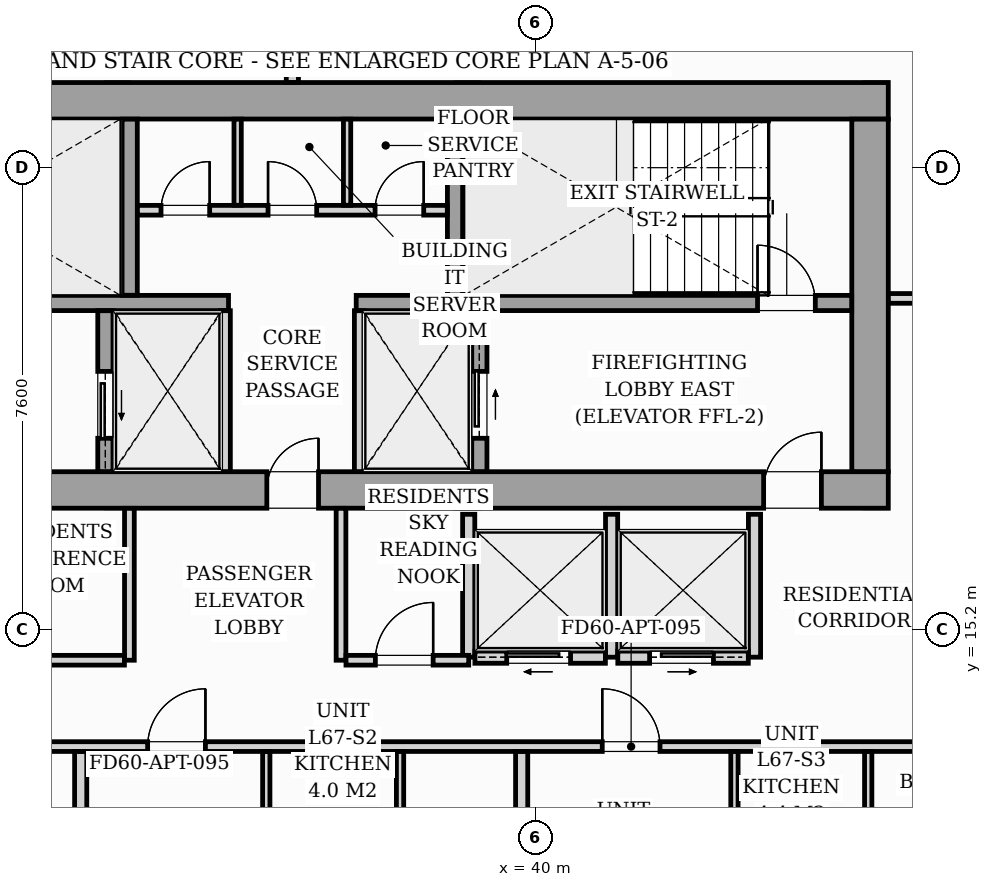
"""IFC4 building model, lengths in metres.
Left out: names, types, materials, properties, quantities, classifications, styles, units other than length and angle.
Written with IfcOpenShell. Run it as: python <this file> out.ifc"""

import sys

from ifc_helpers import new_model, si_unit, direction, frame, frame_2d, origin, origin_2d, place, context, subcontext, project, spatial, rectangle, i_section, extrude, source, transform, mapped, element, fill, save


model = new_model("IFC4")
c1 = context("Model", 3, precision=1e-05, world=origin(), true_north=direction((0.0, 1.0)))
c2 = subcontext(c1, "Body", "Model", "MODEL_VIEW")
j1 = project(units=[si_unit("LENGTHUNIT", "METRE"), si_unit("PLANEANGLEUNIT", "RADIAN")], contexts=[c1])
p1 = place(None, origin())
s1 = spatial("IfcSite", under=j1, at=p1, CompositionType="ELEMENT")
p2 = place(p1, origin())
s2 = spatial("IfcBuilding", under=s1, at=p2, CompositionType="ELEMENT")
p3 = place(p2, frame((0.0, 0.0, 233.1)))
s3 = spatial("IfcBuildingStorey", under=s2, at=p3, CompositionType="ELEMENT", Elevation=233.1)
m1 = source(origin(), c2, "Body", "SweptSolid", [
    extrude(i_section(OverallWidth=0.409, OverallDepth=0.425, WebThickness=0.033, FlangeThickness=0.052, FilletRadius=0.018, at=origin_2d()), origin(), (0.0, 0.0, 1.0), 3.296),
])
for number, where, z_axis, x_axis in (
    (1, (33.12, 17.4, 0.002), (0.0, 0.0, 1.0), (1.0, 0.0, 0.0)),
    (2, (38.88, 17.4, 0.002), (0.0, 0.0, 1.0), (1.0, 0.0, 0.0)),
    (3, (45.6, 17.4, 0.002), (0.0, 0.0, 1.0), (1.0, 0.0, 0.0)),
    (4, (33.12, 24.0, 0.002), (0.0, 0.0, 1.0), (1.0, 0.0, 0.0)),
    (5, (38.88, 24.0, 0.002), (0.0, 0.0, 1.0), (1.0, 0.0, 0.0)),
    (6, (45.6, 24.0, 0.002), (0.0, 0.0, 1.0), (1.0, 0.0, 0.0)),
):
    element("IfcColumn", number, at=place(p3, frame(where, z_axis=z_axis, x_axis=x_axis)), inside=s3, PredefinedType="PILASTER", context=c2, shape_type="MappedRepresentation", body=[
        mapped(m1, transform((0.0, 0.0, 0.0), scale=1.0)),
    ])
p4 = place(p3, frame((26.2, 17.5, 0.0), z_axis=(0.0, 0.0, 1.0), x_axis=(1.0, 0.0, 0.0)))
e7 = element("IfcWall", 7, at=p4, inside=s3, PredefinedType="SHEAR", context=c2, shape_type="SweptSolid", body=[
    extrude(rectangle(XDim=19.6, YDim=0.6, at=frame_2d((9.8, 0.0))), origin(), (0.0, 0.0, 1.0), 3.3),
])
p5 = place(p4, frame((0.95, 0.0, 0.0)))
e8 = element("IfcOpeningElement", 8, at=p5, cuts=e7, PredefinedType="OPENING", context=c2, shape_type="SweptSolid", body=[
    extrude(rectangle(XDim=0.95, YDim=2.06, at=frame_2d((0.475, 1.03))), frame((0.0, 0.31, 0.0), z_axis=(0.0, -1.0, 0.0), x_axis=(1.0, 0.0, 0.0)), (0.0, 0.0, 1.0), 0.62),
])
p6 = place(p4, frame((9.38, 0.0, 0.0)))
e9 = element("IfcOpeningElement", 9, at=p6, cuts=e7, PredefinedType="OPENING", context=c2, shape_type="SweptSolid", body=[
    extrude(rectangle(XDim=0.85, YDim=2.0, at=frame_2d((0.425, 1.0))), frame((0.0, 0.31, 0.0), z_axis=(0.0, -1.0, 0.0), x_axis=(1.0, 0.0, 0.0)), (0.0, 0.0, 1.0), 0.62),
])
p7 = place(p4, frame((17.55, 0.0, 0.0)))
e10 = element("IfcOpeningElement", 10, at=p7, cuts=e7, PredefinedType="OPENING", context=c2, shape_type="SweptSolid", body=[
    extrude(rectangle(XDim=0.95, YDim=2.06, at=frame_2d((0.475, 1.03))), frame((0.0, 0.31, 0.0), z_axis=(0.0, -1.0, 0.0), x_axis=(1.0, 0.0, 0.0)), (0.0, 0.0, 1.0), 0.62),
])
p8 = place(p3, frame((26.2, 23.9, 0.0), z_axis=(0.0, 0.0, 1.0), x_axis=(1.0, 0.0, 0.0)))
e11 = element("IfcWall", 11, at=p8, inside=s3, PredefinedType="SHEAR", context=c2, shape_type="SweptSolid", body=[
    extrude(rectangle(XDim=19.6, YDim=0.6, at=frame_2d((9.8, 0.0))), origin(), (0.0, 0.0, 1.0), 3.3),
])
p9 = place(p3, frame((45.5, 17.802, 0.0), z_axis=(0.0, 0.0, 1.0), x_axis=(0.0, 1.0, 0.0)))
e12 = element("IfcWall", 12, at=p9, inside=s3, PredefinedType="SHEAR", context=c2, shape_type="SweptSolid", body=[
    extrude(rectangle(XDim=5.796, YDim=0.6, at=frame_2d((2.898, 0.0))), origin(), (0.0, 0.0, 1.0), 3.3),
])
p10 = place(p3, frame((26.802, 20.575, 0.0), z_axis=(0.0, 0.0, 1.0), x_axis=(1.0, 0.0, 0.0)))
e13 = element("IfcWall", 13, at=p10, inside=s3, PredefinedType="SOLIDWALL", context=c2, shape_type="SweptSolid", body=[
    extrude(rectangle(XDim=8.148, YDim=0.25, at=frame_2d((4.074, 0.0))), origin(), (0.0, 0.0, 1.0), 3.3),
])
p11 = place(p10, frame((0.298, 0.0, 0.0)))
e14 = element("IfcOpeningElement", 14, at=p11, cuts=e13, PredefinedType="OPENING", context=c2, shape_type="SweptSolid", body=[
    extrude(rectangle(XDim=0.95, YDim=2.06, at=frame_2d((0.475, 1.03))), frame((0.0, 0.135, 0.0), z_axis=(0.0, -1.0, 0.0), x_axis=(1.0, 0.0, 0.0)), (0.0, 0.0, 1.0), 0.27),
])
p12 = place(p3, frame((37.05, 20.575, 0.0), z_axis=(0.0, 0.0, 1.0), x_axis=(1.0, 0.0, 0.0)))
e15 = element("IfcWall", 15, at=p12, inside=s3, PredefinedType="SOLIDWALL", context=c2, shape_type="SweptSolid", body=[
    extrude(rectangle(XDim=8.148, YDim=0.25, at=frame_2d((4.074, 0.0))), origin(), (0.0, 0.0, 1.0), 3.3),
])
p13 = place(p12, frame((6.6, 0.0, 0.0)))
e16 = element("IfcOpeningElement", 16, at=p13, cuts=e15, PredefinedType="OPENING", context=c2, shape_type="SweptSolid", body=[
    extrude(rectangle(XDim=0.95, YDim=2.06, at=frame_2d((0.475, 1.03))), frame((0.0, 0.135, 0.0), z_axis=(0.0, -1.0, 0.0), x_axis=(1.0, 0.0, 0.0)), (0.0, 0.0, 1.0), 0.27),
])
for number, where, z_axis, x_axis in (
    (17, (33.325, 20.702, 0.0), (0.0, 0.0, 1.0), (0.0, 1.0, 0.0)),
    (18, (38.675, 20.702, 0.0), (0.0, 0.0, 1.0), (0.0, 1.0, 0.0)),
):
    element("IfcWall", number, at=place(p3, frame(where, z_axis=z_axis, x_axis=x_axis)), inside=s3, PredefinedType="SOLIDWALL", context=c2, shape_type="SweptSolid", body=[
        extrude(rectangle(XDim=2.896, YDim=0.25, at=frame_2d((1.448, 0.0))), origin(), (0.0, 0.0, 1.0), 3.3),
    ])
p14 = place(p3, frame((32.925, 17.802, 0.0), z_axis=(0.0, 0.0, 1.0), x_axis=(0.0, 1.0, 0.0)))
e19 = element("IfcWall", 19, at=p14, inside=s3, PredefinedType="SOLIDWALL", context=c2, shape_type="SweptSolid", body=[
    extrude(rectangle(XDim=2.646, YDim=0.25, at=frame_2d((1.323, 0.0))), origin(), (0.0, 0.0, 1.0), 3.3),
])
p15 = place(p14, frame((0.548, 0.0, 0.0)))
e20 = element("IfcOpeningElement", 20, at=p15, cuts=e19, PredefinedType="OPENING", context=c2, shape_type="SweptSolid", body=[
    extrude(rectangle(XDim=1.1, YDim=2.08, at=frame_2d((0.55, 1.04))), frame((0.0, 0.135, 0.0), z_axis=(0.0, -1.0, 0.0), x_axis=(1.0, 0.0, 0.0)), (0.0, 0.0, 1.0), 0.27),
])
for number, where, z_axis, x_axis in (
    (21, (34.9, 17.802, 0.0), (0.0, 0.0, 1.0), (0.0, 1.0, 0.0)),
    (22, (37.1, 17.802, 0.0), (0.0, 0.0, 1.0), (0.0, 1.0, 0.0)),
):
    element("IfcWall", number, at=place(p3, frame(where, z_axis=z_axis, x_axis=x_axis)), inside=s3, PredefinedType="PARTITIONING", context=c2, shape_type="SweptSolid", body=[
        extrude(rectangle(XDim=2.646, YDim=0.16, at=frame_2d((1.323, 0.0))), origin(), (0.0, 0.0, 1.0), 3.04),
    ])
p16 = place(p3, frame((39.075, 17.802, 0.0), z_axis=(0.0, 0.0, 1.0), x_axis=(0.0, 1.0, 0.0)))
e23 = element("IfcWall", 23, at=p16, inside=s3, PredefinedType="SOLIDWALL", context=c2, shape_type="SweptSolid", body=[
    extrude(rectangle(XDim=2.646, YDim=0.25, at=frame_2d((1.323, 0.0))), origin(), (0.0, 0.0, 1.0), 3.3),
])
p17 = place(p16, frame((0.548, 0.0, 0.0)))
e24 = element("IfcOpeningElement", 24, at=p17, cuts=e23, PredefinedType="OPENING", context=c2, shape_type="SweptSolid", body=[
    extrude(rectangle(XDim=1.1, YDim=2.08, at=frame_2d((0.55, 1.04))), frame((0.0, 0.135, 0.0), z_axis=(0.0, -1.0, 0.0), x_axis=(1.0, 0.0, 0.0)), (0.0, 0.0, 1.0), 0.27),
])
p18 = place(p3, frame((33.452, 22.1, 0.0), z_axis=(0.0, 0.0, 1.0), x_axis=(1.0, 0.0, 0.0)))
e25 = element("IfcWall", 25, at=p18, inside=s3, PredefinedType="PARTITIONING", context=c2, shape_type="SweptSolid", body=[
    extrude(rectangle(XDim=5.096, YDim=0.16, at=frame_2d((2.548, 0.0))), origin(), (0.0, 0.0, 1.0), 3.04),
])
p19 = place(p18, frame((0.388, 0.0, 0.0)))
e26 = element("IfcOpeningElement", 26, at=p19, cuts=e25, PredefinedType="OPENING", context=c2, shape_type="SweptSolid", body=[
    extrude(rectangle(XDim=0.8, YDim=2.05, at=frame_2d((0.4, 1.025))), frame((0.0, 0.09, 0.0), z_axis=(0.0, -1.0, 0.0), x_axis=(1.0, 0.0, 0.0)), (0.0, 0.0, 1.0), 0.18),
])
p20 = place(p18, frame((2.148, 0.0, 0.0)))
e27 = element("IfcOpeningElement", 27, at=p20, cuts=e25, PredefinedType="OPENING", context=c2, shape_type="SweptSolid", body=[
    extrude(rectangle(XDim=0.8, YDim=2.05, at=frame_2d((0.4, 1.025))), frame((0.0, 0.09, 0.0), z_axis=(0.0, -1.0, 0.0), x_axis=(1.0, 0.0, 0.0)), (0.0, 0.0, 1.0), 0.18),
])
p21 = place(p18, frame((3.908, 0.0, 0.0)))
e28 = element("IfcOpeningElement", 28, at=p21, cuts=e25, PredefinedType="OPENING", context=c2, shape_type="SweptSolid", body=[
    extrude(rectangle(XDim=0.8, YDim=2.05, at=frame_2d((0.4, 1.025))), frame((0.0, 0.09, 0.0), z_axis=(0.0, -1.0, 0.0), x_axis=(1.0, 0.0, 0.0)), (0.0, 0.0, 1.0), 0.18),
])
for number, where, z_axis, x_axis in (
    (29, (35.1, 22.182, 0.0), (0.0, 0.0, 1.0), (0.0, 1.0, 0.0)),
    (30, (36.9, 22.182, 0.0), (0.0, 0.0, 1.0), (0.0, 1.0, 0.0)),
):
    element("IfcWall", number, at=place(p3, frame(where, z_axis=z_axis, x_axis=x_axis)), inside=s3, PredefinedType="PARTITIONING", context=c2, shape_type="SweptSolid", body=[
        extrude(rectangle(XDim=1.416, YDim=0.12, at=frame_2d((0.708, 0.0))), origin(), (0.0, 0.0, 1.0), 3.04),
    ])
for number, where, z_axis, x_axis in (
    (31, (38.9, 14.75, 0.0), (0.0, 0.0, 1.0), (0.0, 1.0, 0.0)),
    (32, (41.25, 14.75, 0.0), (0.0, 0.0, 1.0), (0.0, 1.0, 0.0)),
    (33, (43.6, 14.75, 0.0), (0.0, 0.0, 1.0), (0.0, 1.0, 0.0)),
):
    element("IfcWall", number, at=place(p3, frame(where, z_axis=z_axis, x_axis=x_axis)), inside=s3, PredefinedType="PARTITIONING", context=c2, shape_type="SweptSolid", body=[
        extrude(rectangle(XDim=2.35, YDim=0.2, at=frame_2d((1.175, 0.0))), origin(), (0.0, 0.0, 1.0), 3.04),
    ])
p22 = place(p3, frame((39.002, 14.75, 0.0), z_axis=(0.0, 0.0, 1.0), x_axis=(1.0, 0.0, 0.0)))
e34 = element("IfcWall", 34, at=p22, inside=s3, PredefinedType="PARTITIONING", context=c2, shape_type="SweptSolid", body=[
    extrude(rectangle(XDim=2.146, YDim=0.2, at=frame_2d((1.073, 0.0))), origin(), (0.0, 0.0, 1.0), 3.04),
])
p23 = place(p22, frame((0.523, 0.0, 0.0)))
e35 = element("IfcOpeningElement", 35, at=p23, cuts=e34, PredefinedType="OPENING", context=c2, shape_type="SweptSolid", body=[
    extrude(rectangle(XDim=1.05, YDim=2.08, at=frame_2d((0.525, 1.04))), frame((0.0, 0.11, 0.0), z_axis=(0.0, -1.0, 0.0), x_axis=(1.0, 0.0, 0.0)), (0.0, 0.0, 1.0), 0.22),
])
p24 = place(p3, frame((41.352, 14.75, 0.0), z_axis=(0.0, 0.0, 1.0), x_axis=(1.0, 0.0, 0.0)))
e36 = element("IfcWall", 36, at=p24, inside=s3, PredefinedType="PARTITIONING", context=c2, shape_type="SweptSolid", body=[
    extrude(rectangle(XDim=2.146, YDim=0.2, at=frame_2d((1.073, 0.0))), origin(), (0.0, 0.0, 1.0), 3.04),
])
p25 = place(p24, frame((0.523, 0.0, 0.0)))
e37 = element("IfcOpeningElement", 37, at=p25, cuts=e36, PredefinedType="OPENING", context=c2, shape_type="SweptSolid", body=[
    extrude(rectangle(XDim=1.05, YDim=2.08, at=frame_2d((0.525, 1.04))), frame((0.0, 0.11, 0.0), z_axis=(0.0, -1.0, 0.0), x_axis=(1.0, 0.0, 0.0)), (0.0, 0.0, 1.0), 0.22),
])
p26 = place(p3, frame((26.12, 13.28, 0.0), z_axis=(0.0, 0.0, 1.0), x_axis=(1.0, 0.0, 0.0)))
e38 = element("IfcWall", 38, at=p26, inside=s3, PredefinedType="PARTITIONING", context=c2, shape_type="SweptSolid", body=[
    extrude(rectangle(XDim=21.33, YDim=0.16, at=frame_2d((10.665, 0.0))), origin(), (0.0, 0.0, 1.0), 2.556),
])
p27 = place(p26, frame((4.704, 0.0, 0.0)))
e39 = element("IfcOpeningElement", 39, at=p27, cuts=e38, PredefinedType="OPENING", context=c2, shape_type="SweptSolid", body=[
    extrude(rectangle(XDim=0.95, YDim=2.06, at=frame_2d((0.475, 1.03))), frame((0.0, 0.09, 0.0), z_axis=(0.0, -1.0, 0.0), x_axis=(1.0, 0.0, 0.0)), (0.0, 0.0, 1.0), 0.18),
])
p28 = place(p26, frame((7.5, 0.0, 0.0)))
e40 = element("IfcOpeningElement", 40, at=p28, cuts=e38, PredefinedType="OPENING", context=c2, shape_type="SweptSolid", body=[
    extrude(rectangle(XDim=0.95, YDim=2.06, at=frame_2d((0.475, 1.03))), frame((0.0, 0.09, 0.0), z_axis=(0.0, -1.0, 0.0), x_axis=(1.0, 0.0, 0.0)), (0.0, 0.0, 1.0), 0.18),
])
p29 = place(p26, frame((14.976, 0.0, 0.0)))
e41 = element("IfcOpeningElement", 41, at=p29, cuts=e38, PredefinedType="OPENING", context=c2, shape_type="SweptSolid", body=[
    extrude(rectangle(XDim=0.95, YDim=2.06, at=frame_2d((0.475, 1.03))), frame((0.0, 0.09, 0.0), z_axis=(0.0, -1.0, 0.0), x_axis=(1.0, 0.0, 0.0)), (0.0, 0.0, 1.0), 0.18),
])
p30 = place(p3, frame((36.0, 24.202, 0.0), z_axis=(0.0, 0.0, 1.0), x_axis=(0.0, 1.0, 0.0)))
e42 = element("IfcWall", 42, at=p30, inside=s3, PredefinedType="PARTITIONING", context=c2, shape_type="SweptSolid", body=[
    extrude(rectangle(XDim=2.363, YDim=0.2, at=frame_2d((1.182, 0.0))), origin(), (0.0, 0.0, 1.0), 3.04),
])
p31 = place(p3, frame((45.802, 20.65, 0.0), z_axis=(0.0, 0.0, 1.0), x_axis=(1.0, 0.0, 0.0)))
e43 = element("IfcWall", 43, at=p31, inside=s3, PredefinedType="PARTITIONING", context=c2, shape_type="SweptSolid", body=[
    extrude(rectangle(XDim=1.566, YDim=0.16, at=frame_2d((0.783, 0.0))), origin(), (0.0, 0.0, 1.0), 3.04),
])
p32 = place(p3, frame((32.519, 9.169, 0.0), z_axis=(0.0, 0.0, 1.0), x_axis=(0.0, 1.0, 0.0)))
e44 = element("IfcWall", 44, at=p32, inside=s3, PredefinedType="PARTITIONING", context=c2, shape_type="SweptSolid", body=[
    extrude(rectangle(XDim=4.029, YDim=0.2, at=frame_2d((2.014, 0.0))), origin(), (0.0, 0.0, 1.0), 2.4),
])
for number, where, z_axis, x_axis in (
    (45, (35.571, 11.273, 0.0), (0.0, 0.0, 1.0), (0.0, 1.0, 0.0)),
    (46, (37.771, 11.273, 0.0), (0.0, 0.0, 1.0), (0.0, 1.0, 0.0)),
):
    element("IfcWall", number, at=place(p3, frame(where, z_axis=z_axis, x_axis=x_axis)), inside=s3, PredefinedType="PARTITIONING", context=c2, shape_type="SweptSolid", body=[
        extrude(rectangle(XDim=1.925, YDim=0.12, at=frame_2d((0.962, 0.0))), origin(), (0.0, 0.0, 1.0), 3.04),
    ])
p33 = place(p3, frame((39.771, 11.273, 0.0), z_axis=(0.0, 0.0, 1.0), x_axis=(0.0, 1.0, 0.0)))
e47 = element("IfcWall", 47, at=p33, inside=s3, PredefinedType="PARTITIONING", context=c2, shape_type="SweptSolid", body=[
    extrude(rectangle(XDim=1.925, YDim=0.2, at=frame_2d((0.962, 0.0))), origin(), (0.0, 0.0, 1.0), 3.04),
])
for number, where, z_axis, x_axis in (
    (48, (43.27, 11.092, 0.0), (0.0, 0.0, 1.0), (0.0, 1.0, 0.0)),
    (49, (45.47, 11.092, 0.0), (0.0, 0.0, 1.0), (0.0, 1.0, 0.0)),
):
    element("IfcWall", number, at=place(p3, frame(where, z_axis=z_axis, x_axis=x_axis)), inside=s3, PredefinedType="PARTITIONING", context=c2, shape_type="SweptSolid", body=[
        extrude(rectangle(XDim=2.106, YDim=0.12, at=frame_2d((1.053, 0.0))), origin(), (0.0, 0.0, 1.0), 3.04),
    ])
p34 = place(p3, frame((33.32, 14.7, 0.0), z_axis=(0.0, 0.0, 1.0), x_axis=(0.0, 1.0, 0.0)))
e50 = element("IfcWall", 50, at=p34, inside=s3, PredefinedType="PARTITIONING", context=c2, shape_type="SweptSolid", body=[
    extrude(rectangle(XDim=2.498, YDim=0.16, at=frame_2d((1.249, 0.0))), origin(), (0.0, 0.0, 1.0), 3.04),
])
p35 = place(p3, frame((28.442, 14.7, 0.0), z_axis=(0.0, 0.0, 1.0), x_axis=(1.0, 0.0, 0.0)))
e51 = element("IfcWall", 51, at=p35, inside=s3, PredefinedType="PARTITIONING", context=c2, shape_type="SweptSolid", body=[
    extrude(rectangle(XDim=4.796, YDim=0.16, at=frame_2d((2.398, 0.0))), origin(), (0.0, 0.0, 1.0), 2.556),
])
p36 = place(p35, frame((1.923, 0.0, 0.0)))
e52 = element("IfcOpeningElement", 52, at=p36, cuts=e51, PredefinedType="OPENING", context=c2, shape_type="SweptSolid", body=[
    extrude(rectangle(XDim=0.95, YDim=2.06, at=frame_2d((0.475, 1.03))), frame((0.0, 0.09, 0.0), z_axis=(0.0, -1.0, 0.0), x_axis=(1.0, 0.0, 0.0)), (0.0, 0.0, 1.0), 0.18),
])
p37 = place(p3, frame((36.8, 14.7, 0.0), z_axis=(0.0, 0.0, 1.0), x_axis=(0.0, 1.0, 0.0)))
e53 = element("IfcWall", 53, at=p37, inside=s3, PredefinedType="PARTITIONING", context=c2, shape_type="SweptSolid", body=[
    extrude(rectangle(XDim=2.498, YDim=0.16, at=frame_2d((1.249, 0.0))), origin(), (0.0, 0.0, 1.0), 3.04),
])
p38 = place(p3, frame((36.882, 14.7, 0.0), z_axis=(0.0, 0.0, 1.0), x_axis=(1.0, 0.0, 0.0)))
e54 = element("IfcWall", 54, at=p38, inside=s3, PredefinedType="PARTITIONING", context=c2, shape_type="SweptSolid", body=[
    extrude(rectangle(XDim=2.018, YDim=0.16, at=frame_2d((1.009, 0.0))), origin(), (0.0, 0.0, 1.0), 3.04),
])
p39 = place(p38, frame((0.483, 0.0, 0.0)))
e55 = element("IfcOpeningElement", 55, at=p39, cuts=e54, PredefinedType="OPENING", context=c2, shape_type="SweptSolid", body=[
    extrude(rectangle(XDim=0.95, YDim=2.06, at=frame_2d((0.475, 1.03))), frame((0.0, 0.09, 0.0), z_axis=(0.0, -1.0, 0.0), x_axis=(1.0, 0.0, 0.0)), (0.0, 0.0, 1.0), 0.18),
])
m2 = source(origin(), c2, "Body", "SweptSolid", [
    extrude(rectangle(XDim=0.85, YDim=2.0, at=frame_2d((0.425, 1.0))), frame((0.0, 0.025, 0.0), z_axis=(0.0, -1.0, 0.0), x_axis=(1.0, 0.0, 0.0)), (0.0, 0.0, 1.0), 0.05),
])
p40 = place(p6, origin())
e56 = element("IfcDoor", 56, at=p40, inside=s3, OperationType="SINGLE_SWING_RIGHT", PredefinedType="DOOR", context=c2, shape_type="MappedRepresentation", body=[
    mapped(m2, transform((0.0, 0.0, 0.0), scale=1.0)),
])
fill(e9, e56)
m3 = source(origin(), c2, "Body", "SweptSolid", [
    extrude(rectangle(XDim=0.95, YDim=2.06, at=frame_2d((0.475, 1.03))), frame((0.0, 0.025, 0.0), z_axis=(0.0, -1.0, 0.0), x_axis=(1.0, 0.0, 0.0)), (0.0, 0.0, 1.0), 0.05),
])
p41 = place(p7, origin())
e57 = element("IfcDoor", 57, at=p41, inside=s3, OperationType="SINGLE_SWING_RIGHT", PredefinedType="DOOR", context=c2, shape_type="MappedRepresentation", body=[
    mapped(m3, transform((0.0, 0.0, 0.0), scale=1.0)),
])
fill(e10, e57)
p42 = place(p13, origin())
e58 = element("IfcDoor", 58, at=p42, inside=s3, OperationType="SINGLE_SWING_LEFT", PredefinedType="DOOR", context=c2, shape_type="MappedRepresentation", body=[
    mapped(m3, transform((0.0, 0.0, 0.0), scale=1.0)),
])
fill(e16, e58)
m4 = source(origin(), c2, "Body", "SweptSolid", [
    extrude(rectangle(XDim=1.1, YDim=2.08, at=frame_2d((0.55, 1.04))), frame((0.0, 0.025, 0.0), z_axis=(0.0, -1.0, 0.0), x_axis=(1.0, 0.0, 0.0)), (0.0, 0.0, 1.0), 0.05),
])
p43 = place(p15, origin())
e59 = element("IfcDoor", 59, at=p43, inside=s3, OperationType="SLIDING_TO_LEFT", PredefinedType="DOOR", context=c2, shape_type="MappedRepresentation", body=[
    mapped(m4, transform((0.0, 0.0, 0.0), scale=1.0)),
])
fill(e20, e59)
p44 = place(p17, origin())
e60 = element("IfcDoor", 60, at=p44, inside=s3, OperationType="SLIDING_TO_RIGHT", PredefinedType="DOOR", context=c2, shape_type="MappedRepresentation", body=[
    mapped(m4, transform((0.0, 0.0, 0.0), scale=1.0)),
])
fill(e24, e60)
m5 = source(origin(), c2, "Body", "SweptSolid", [
    extrude(rectangle(XDim=0.8, YDim=2.05, at=frame_2d((0.4, 1.025))), frame((0.0, 0.025, 0.0), z_axis=(0.0, -1.0, 0.0), x_axis=(1.0, 0.0, 0.0)), (0.0, 0.0, 1.0), 0.05),
])
p45 = place(p19, origin())
e61 = element("IfcDoor", 61, at=p45, inside=s3, OperationType="SINGLE_SWING_RIGHT", PredefinedType="DOOR", context=c2, shape_type="MappedRepresentation", body=[
    mapped(m5, transform((0.0, 0.0, 0.0), scale=1.0)),
])
fill(e26, e61)
p46 = place(p20, origin())
e62 = element("IfcDoor", 62, at=p46, inside=s3, OperationType="SINGLE_SWING_LEFT", PredefinedType="DOOR", context=c2, shape_type="MappedRepresentation", body=[
    mapped(m5, transform((0.0, 0.0, 0.0), scale=1.0)),
])
fill(e27, e62)
p47 = place(p21, origin())
e63 = element("IfcDoor", 63, at=p47, inside=s3, OperationType="SINGLE_SWING_RIGHT", PredefinedType="DOOR", context=c2, shape_type="MappedRepresentation", body=[
    mapped(m5, transform((0.0, 0.0, 0.0), scale=1.0)),
])
fill(e28, e63)
m6 = source(origin(), c2, "Body", "SweptSolid", [
    extrude(rectangle(XDim=1.05, YDim=2.08, at=frame_2d((0.525, 1.04))), frame((0.0, 0.025, 0.0), z_axis=(0.0, -1.0, 0.0), x_axis=(1.0, 0.0, 0.0)), (0.0, 0.0, 1.0), 0.05),
])
p48 = place(p23, origin())
e64 = element("IfcDoor", 64, at=p48, inside=s3, OperationType="SLIDING_TO_LEFT", PredefinedType="DOOR", context=c2, shape_type="MappedRepresentation", body=[
    mapped(m6, transform((0.0, 0.0, 0.0), scale=1.0)),
])
fill(e35, e64)
p49 = place(p25, origin())
e65 = element("IfcDoor", 65, at=p49, inside=s3, OperationType="SLIDING_TO_RIGHT", PredefinedType="DOOR", context=c2, shape_type="MappedRepresentation", body=[
    mapped(m6, transform((0.0, 0.0, 0.0), scale=1.0)),
])
fill(e37, e65)
m7 = source(origin(), c2, "Body", "SweptSolid", [
    extrude(rectangle(XDim=0.95, YDim=2.06, at=frame_2d((0.475, 1.03))), frame((0.0, 0.025, 0.0), z_axis=(0.0, -1.0, 0.0), x_axis=(1.0, 0.0, 0.0)), (0.0, 0.0, 1.0), 0.05),
])
p50 = place(p28, origin())
e66 = element("IfcDoor", 66, at=p50, inside=s3, OperationType="SINGLE_SWING_RIGHT", PredefinedType="DOOR", context=c2, shape_type="MappedRepresentation", body=[
    mapped(m7, transform((0.0, 0.0, 0.0), scale=1.0)),
])
fill(e40, e66)
p51 = place(p29, origin())
e67 = element("IfcDoor", 67, at=p51, inside=s3, OperationType="SINGLE_SWING_LEFT", PredefinedType="DOOR", context=c2, shape_type="MappedRepresentation", body=[
    mapped(m7, transform((0.0, 0.0, 0.0), scale=1.0)),
])
fill(e41, e67)
p52 = place(p39, origin())
e68 = element("IfcDoor", 68, at=p52, inside=s3, OperationType="SINGLE_SWING_RIGHT", PredefinedType="DOOR", context=c2, shape_type="MappedRepresentation", body=[
    mapped(m7, transform((0.0, 0.0, 0.0), scale=1.0)),
])
fill(e55, e68)
save(model, sys.argv[1])
